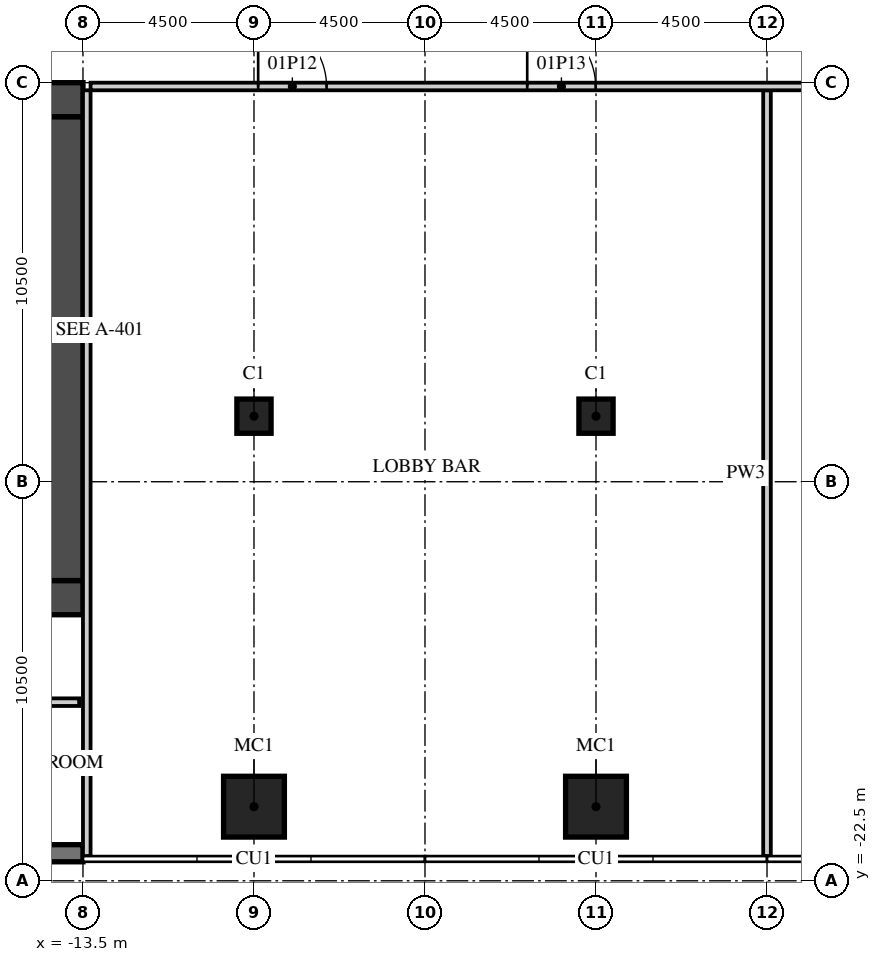
"""IFC4 building model, lengths in metres.
Left out: names, types, materials, properties, quantities, classifications, styles, units other than length and angle.
Written with IfcOpenShell. Run it as: python <this file> out.ifc"""

import sys

from ifc_helpers import new_model, si_unit, direction, frame, frame_2d, origin, origin_2d, place, context, subcontext, project, spatial, rectangle, extrude, element, fill, save


model = new_model("IFC4")
c1 = context("Model", 3, precision=1e-05, world=origin(), true_north=direction((0.0, 1.0)))
c2 = subcontext(c1, "Body", "Model", "MODEL_VIEW")
j1 = project(units=[si_unit("LENGTHUNIT", "METRE"), si_unit("PLANEANGLEUNIT", "RADIAN")], contexts=[c1])
p1 = place(None, origin())
s1 = spatial("IfcSite", under=j1, at=p1, CompositionType="ELEMENT")
p2 = place(p1, origin())
s2 = spatial("IfcBuilding", under=s1, at=p2, CompositionType="ELEMENT")
p3 = place(p2, frame((0.0, 0.0, 11.0)))
s3 = spatial("IfcBuildingStorey", under=s2, at=p3, CompositionType="ELEMENT", Elevation=11.0)
for number, where, z_axis, x_axis in (
    (1, (-9.0, -20.55, 0.0), (0.0, 0.0, 1.0), (1.0, 0.0, 0.0)),
    (2, (0.0, -20.55, 0.0), (0.0, 0.0, 1.0), (1.0, 0.0, 0.0)),
):
    element("IfcColumn", number, at=place(p3, frame(where, z_axis=z_axis, x_axis=x_axis)), inside=s3, PredefinedType="COLUMN", context=c2, shape_type="SweptSolid", body=[
        extrude(rectangle(XDim=1.6, YDim=1.6, at=origin_2d()), origin(), (0.0, 0.0, 1.0), 6.0),
    ])
for number, where, z_axis, x_axis in (
    (3, (-9.0, -10.275, 0.0), (0.0, 0.0, 1.0), (1.0, 0.0, 0.0)),
    (4, (0.0, -10.275, 0.0), (0.0, 0.0, 1.0), (1.0, 0.0, 0.0)),
):
    element("IfcColumn", number, at=place(p3, frame(where, z_axis=z_axis, x_axis=x_axis)), inside=s3, PredefinedType="COLUMN", context=c2, shape_type="SweptSolid", body=[
        extrude(rectangle(XDim=0.9, YDim=0.9, at=origin_2d()), origin(), (0.0, 0.0, 1.0), 6.0),
    ])
p4 = place(p3, frame((-31.5, -21.775, 0.0), z_axis=(0.0, 0.0, 1.0), x_axis=(1.0, 0.0, 0.0)))
e5 = element("IfcWall", 5, at=p4, inside=s3, PredefinedType="SOLIDWALL", context=c2, shape_type="SweptSolid", body=[
    extrude(rectangle(XDim=18.0, YDim=0.45, at=frame_2d((9.0, 0.0))), origin(), (0.0, 0.0, 1.0), 5.55),
])
p5 = place(p3, frame((-31.5, -1.95, 0.0), z_axis=(0.0, 0.0, 1.0), x_axis=(1.0, 0.0, 0.0)))
e6 = element("IfcWall", 6, at=p5, inside=s3, PredefinedType="SHEAR", context=c2, shape_type="SweptSolid", body=[
    extrude(rectangle(XDim=18.0, YDim=0.9, at=frame_2d((9.0, 0.0))), origin(), (0.0, 0.0, 1.0), 5.55),
])
p6 = place(p5, frame((14.725, 0.0, 0.0)))
e7 = element("IfcOpeningElement", 7, at=p6, cuts=e6, PredefinedType="OPENING", context=c2, shape_type="SweptSolid", body=[
    extrude(rectangle(XDim=1.8, YDim=2.1, at=frame_2d((0.9, 1.05))), frame((0.0, 0.46, 0.0), z_axis=(0.0, -1.0, 0.0), x_axis=(1.0, 0.0, 0.0)), (0.0, 0.0, 1.0), 0.92),
])
p7 = place(p3, frame((-20.3, -15.05, 0.0), z_axis=(0.0, 0.0, 1.0), x_axis=(1.0, 0.0, 0.0)))
e8 = element("IfcWall", 8, at=p7, inside=s3, PredefinedType="SHEAR", context=c2, shape_type="SweptSolid", body=[
    extrude(rectangle(XDim=6.8, YDim=0.9, at=frame_2d((3.4, 0.0))), origin(), (0.0, 0.0, 1.0), 5.55),
])
p8 = place(p7, frame((0.875, 0.0, 0.0)))
e9 = element("IfcOpeningElement", 9, at=p8, cuts=e8, PredefinedType="OPENING", context=c2, shape_type="SweptSolid", body=[
    extrude(rectangle(XDim=1.2, YDim=2.1, at=frame_2d((0.6, 1.05))), frame((0.0, 0.46, 0.0), z_axis=(0.0, -1.0, 0.0), x_axis=(1.0, 0.0, 0.0)), (0.0, 0.0, 1.0), 0.92),
])
p9 = place(p3, frame((-13.95, -14.6, 0.0), z_axis=(0.0, 0.0, 1.0), x_axis=(0.0, 1.0, 0.0)))
e10 = element("IfcWall", 10, at=p9, inside=s3, PredefinedType="SHEAR", context=c2, shape_type="SweptSolid", body=[
    extrude(rectangle(XDim=12.2, YDim=0.9, at=frame_2d((6.1, 0.0))), origin(), (0.0, 0.0, 1.0), 5.55),
])
p10 = place(p3, frame((-44.55, -17.8, 0.0), z_axis=(0.0, 0.0, 1.0), x_axis=(1.0, 0.0, 0.0)))
e11 = element("IfcWall", 11, at=p10, inside=s3, PredefinedType="PARTITIONING", context=c2, shape_type="SweptSolid", body=[
    extrude(rectangle(XDim=30.95, YDim=0.2, at=frame_2d((15.475, 0.0))), origin(), (0.0, 0.0, 1.0), 5.55),
])
p11 = place(p10, frame((12.238, 0.0, 0.0)))
e12 = element("IfcOpeningElement", 12, at=p11, cuts=e11, PredefinedType="OPENING", context=c2, shape_type="SweptSolid", body=[
    extrude(rectangle(XDim=0.9, YDim=2.1, at=frame_2d((0.45, 1.05))), frame((0.0, 0.11, 0.0), z_axis=(0.0, -1.0, 0.0), x_axis=(1.0, 0.0, 0.0)), (0.0, 0.0, 1.0), 0.22),
])
p12 = place(p10, frame((20.538, 0.0, 0.0)))
e13 = element("IfcOpeningElement", 13, at=p12, cuts=e11, PredefinedType="OPENING", context=c2, shape_type="SweptSolid", body=[
    extrude(rectangle(XDim=0.9, YDim=2.1, at=frame_2d((0.45, 1.05))), frame((0.0, 0.11, 0.0), z_axis=(0.0, -1.0, 0.0), x_axis=(1.0, 0.0, 0.0)), (0.0, 0.0, 1.0), 0.22),
])
p13 = place(p3, frame((4.5, -21.85, 0.0), z_axis=(0.0, 0.0, 1.0), x_axis=(0.0, 1.0, 0.0)))
e14 = element("IfcWall", 14, at=p13, inside=s3, PredefinedType="PARTITIONING", context=c2, shape_type="SweptSolid", body=[
    extrude(rectangle(XDim=20.15, YDim=0.2, at=frame_2d((10.075, 0.0))), origin(), (0.0, 0.0, 1.0), 5.55),
])
p14 = place(p3, frame((-13.3, -1.6, 0.0), z_axis=(0.0, 0.0, 1.0), x_axis=(1.0, 0.0, 0.0)))
e15 = element("IfcWall", 15, at=p14, inside=s3, PredefinedType="PARTITIONING", context=c2, shape_type="SweptSolid", body=[
    extrude(rectangle(XDim=52.7, YDim=0.2, at=frame_2d((26.35, 0.0))), origin(), (0.0, 0.0, 1.0), 5.55),
])
p15 = place(p14, frame((4.41, 0.0, 0.0)))
e16 = element("IfcOpeningElement", 16, at=p15, cuts=e15, PredefinedType="OPENING", context=c2, shape_type="SweptSolid", body=[
    extrude(rectangle(XDim=1.8, YDim=2.1, at=frame_2d((0.9, 1.05))), frame((0.0, 0.11, 0.0), z_axis=(0.0, -1.0, 0.0), x_axis=(1.0, 0.0, 0.0)), (0.0, 0.0, 1.0), 0.22),
])
p16 = place(p14, frame((11.49, 0.0, 0.0)))
e17 = element("IfcOpeningElement", 17, at=p16, cuts=e15, PredefinedType="OPENING", context=c2, shape_type="SweptSolid", body=[
    extrude(rectangle(XDim=1.8, YDim=2.1, at=frame_2d((0.9, 1.05))), frame((0.0, 0.11, 0.0), z_axis=(0.0, -1.0, 0.0), x_axis=(1.0, 0.0, 0.0)), (0.0, 0.0, 1.0), 0.22),
])
p17 = place(p14, frame((21.4, 0.0, 0.0)))
e18 = element("IfcOpeningElement", 18, at=p17, cuts=e15, PredefinedType="OPENING", context=c2, shape_type="SweptSolid", body=[
    extrude(rectangle(XDim=1.8, YDim=2.1, at=frame_2d((0.9, 1.05))), frame((0.0, 0.11, 0.0), z_axis=(0.0, -1.0, 0.0), x_axis=(1.0, 0.0, 0.0)), (0.0, 0.0, 1.0), 0.22),
])
p18 = place(p14, frame((30.8, 0.0, 0.0)))
e19 = element("IfcOpeningElement", 19, at=p18, cuts=e15, PredefinedType="OPENING", context=c2, shape_type="SweptSolid", body=[
    extrude(rectangle(XDim=1.0, YDim=2.1, at=frame_2d((0.5, 1.05))), frame((0.0, 0.11, 0.0), z_axis=(0.0, -1.0, 0.0), x_axis=(1.0, 0.0, 0.0)), (0.0, 0.0, 1.0), 0.22),
])
p19 = place(p14, frame((37.125, 0.0, 0.0)))
e20 = element("IfcOpeningElement", 20, at=p19, cuts=e15, PredefinedType="OPENING", context=c2, shape_type="SweptSolid", body=[
    extrude(rectangle(XDim=1.2, YDim=2.1, at=frame_2d((0.6, 1.05))), frame((0.0, 0.11, 0.0), z_axis=(0.0, -1.0, 0.0), x_axis=(1.0, 0.0, 0.0)), (0.0, 0.0, 1.0), 0.22),
])
p20 = place(p14, frame((46.2, 0.0, 0.0)))
e21 = element("IfcOpeningElement", 21, at=p20, cuts=e15, PredefinedType="OPENING", context=c2, shape_type="SweptSolid", body=[
    extrude(rectangle(XDim=1.8, YDim=2.1, at=frame_2d((0.9, 1.05))), frame((0.0, 0.11, 0.0), z_axis=(0.0, -1.0, 0.0), x_axis=(1.0, 0.0, 0.0)), (0.0, 0.0, 1.0), 0.22),
])
p21 = place(p14, frame((49.6, 0.0, 0.0)))
e22 = element("IfcOpeningElement", 22, at=p21, cuts=e15, PredefinedType="OPENING", context=c2, shape_type="SweptSolid", body=[
    extrude(rectangle(XDim=1.8, YDim=2.1, at=frame_2d((0.9, 1.05))), frame((0.0, 0.11, 0.0), z_axis=(0.0, -1.0, 0.0), x_axis=(1.0, 0.0, 0.0)), (0.0, 0.0, 1.0), 0.22),
])
p22 = place(p3, frame((-13.4, -21.85, 0.0), z_axis=(0.0, 0.0, 1.0), x_axis=(0.0, 1.0, 0.0)))
e23 = element("IfcWall", 23, at=p22, inside=s3, PredefinedType="PARTITIONING", context=c2, shape_type="SweptSolid", body=[
    extrude(rectangle(XDim=20.15, YDim=0.2, at=frame_2d((10.075, 0.0))), origin(), (0.0, 0.0, 1.0), 5.55),
])
p23 = place(p15, origin())
e24 = element("IfcDoor", 24, at=p23, inside=s3, OperationType="DOUBLE_DOOR_DOUBLE_SWING", PredefinedType="DOOR", context=c2, shape_type="SweptSolid", body=[
    extrude(rectangle(XDim=1.8, YDim=2.1, at=frame_2d((0.9, 1.05))), frame((0.0, 0.025, 0.0), z_axis=(0.0, -1.0, 0.0), x_axis=(1.0, 0.0, 0.0)), (0.0, 0.0, 1.0), 0.05),
])
fill(e16, e24)
p24 = place(p16, origin())
e25 = element("IfcDoor", 25, at=p24, inside=s3, OperationType="DOUBLE_DOOR_DOUBLE_SWING", PredefinedType="DOOR", context=c2, shape_type="SweptSolid", body=[
    extrude(rectangle(XDim=1.8, YDim=2.1, at=frame_2d((0.9, 1.05))), frame((0.0, 0.025, 0.0), z_axis=(0.0, -1.0, 0.0), x_axis=(1.0, 0.0, 0.0)), (0.0, 0.0, 1.0), 0.05),
])
fill(e17, e25)
save(model, sys.argv[1])
